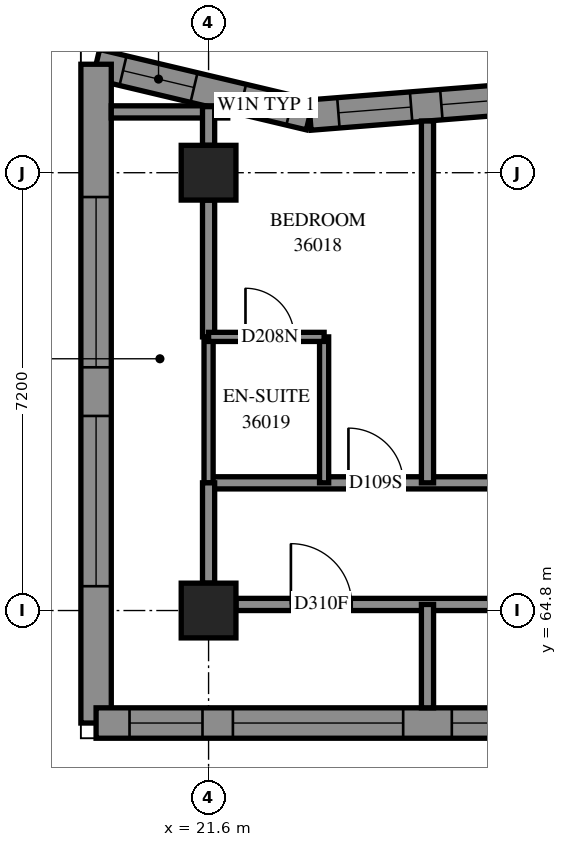
"""IFC4 building model, lengths in metres.
Left out: names, types, materials, properties, quantities, classifications, styles, units other than length and angle.
Written with IfcOpenShell. Run it as: python <this file> out.ifc"""

import sys

from ifc_helpers import new_model, si_unit, direction, frame, frame_2d, origin, origin_2d, place, context, subcontext, project, spatial, polyline, rectangle, outline, extrude, element, fill, save


model = new_model("IFC4")
c1 = context("Model", 3, precision=1e-05, world=origin(), true_north=direction((0.0, 1.0)))
c2 = subcontext(c1, "Body", "Model", "MODEL_VIEW")
j1 = project(units=[si_unit("LENGTHUNIT", "METRE"), si_unit("PLANEANGLEUNIT", "RADIAN")], contexts=[c1])
p1 = place(None, origin())
s1 = spatial("IfcSite", under=j1, at=p1, CompositionType="ELEMENT")
p2 = place(p1, origin())
s2 = spatial("IfcBuilding", under=s1, at=p2, CompositionType="ELEMENT")
p3 = place(p2, frame((0.0, 0.0, 135.4)))
s3 = spatial("IfcBuildingStorey", under=s2, at=p3, CompositionType="ELEMENT", Elevation=135.4)
for number, where, z_axis, x_axis in (
    (1, (21.6, 64.8, 0.0), (0.0, 0.0, 1.0), (1.0, 0.0, 0.0)),
    (2, (21.6, 72.0, 0.0), (0.0, 0.0, 1.0), (1.0, 0.0, 0.0)),
):
    element("IfcColumn", number, at=place(p3, frame(where, z_axis=z_axis, x_axis=x_axis)), inside=s3, PredefinedType="COLUMN", context=c2, shape_type="SweptSolid", body=[
        extrude(rectangle(XDim=0.9, YDim=0.9, at=origin_2d()), origin(), (0.0, 0.0, 1.0), 3.1),
    ])
p4 = place(p3, frame((27.071, 73.249, 0.0), z_axis=(0.0, 0.0, 1.0), x_axis=(-0.9968755515, -0.0789881945, 0.0)))
e3 = element("IfcWall", 3, at=p4, inside=s3, PredefinedType="SOLIDWALL", context=c2, shape_type="SweptSolid", body=[
    extrude(outline(polyline([(-0.02, -0.25), (3.778, -0.25), (3.856, 0.25), (0.02, 0.25), (-0.02, -0.25)])), origin(), (0.0, 0.0, 1.0), 3.1),
])
p5 = place(p4, frame((0.449, 0.0, 0.45)))
e4 = element("IfcOpeningElement", 4, at=p5, cuts=e3, PredefinedType="OPENING", context=c2, shape_type="SweptSolid", body=[
    extrude(rectangle(XDim=1.2, YDim=2.5, at=frame_2d((0.6, 1.25))), frame((0.0, 0.26, 0.0), z_axis=(0.0, -1.0, 0.0), x_axis=(1.0, 0.0, 0.0)), (0.0, 0.0, 1.0), 0.52),
])
p6 = place(p4, frame((2.147, 0.0, 0.45)))
e5 = element("IfcOpeningElement", 5, at=p6, cuts=e3, PredefinedType="OPENING", context=c2, shape_type="SweptSolid", body=[
    extrude(rectangle(XDim=1.2, YDim=2.5, at=frame_2d((0.6, 1.25))), frame((0.0, 0.26, 0.0), z_axis=(0.0, -1.0, 0.0), x_axis=(1.0, 0.0, 0.0)), (0.0, 0.0, 1.0), 0.52),
])
p7 = place(p3, frame((23.266, 72.948, 0.0), z_axis=(0.0, 0.0, 1.0), x_axis=(-0.9728851289, 0.2312888368, 0.0)))
e6 = element("IfcWall", 6, at=p7, inside=s3, PredefinedType="SOLIDWALL", context=c2, shape_type="SweptSolid", body=[
    extrude(outline(polyline([(0.039, -0.25), (3.93, -0.25), (3.298, 0.25), (-0.039, 0.25), (0.039, -0.25)])), origin(), (0.0, 0.0, 1.0), 3.1),
])
p8 = place(p7, frame((0.338, 0.0, 0.45)))
e7 = element("IfcOpeningElement", 7, at=p8, cuts=e6, PredefinedType="OPENING", context=c2, shape_type="SweptSolid", body=[
    extrude(rectangle(XDim=0.8, YDim=2.5, at=frame_2d((0.4, 1.25))), frame((0.0, 0.26, 0.0), z_axis=(0.0, -1.0, 0.0), x_axis=(1.0, 0.0, 0.0)), (0.0, 0.0, 1.0), 0.52),
])
p9 = place(p7, frame((1.959, 0.0, 0.5)))
e8 = element("IfcOpeningElement", 8, at=p9, cuts=e6, PredefinedType="OPENING", context=c2, shape_type="SweptSolid", body=[
    extrude(rectangle(XDim=1.2, YDim=2.45, at=frame_2d((0.6, 1.225))), frame((0.0, 0.26, 0.0), z_axis=(0.0, -1.0, 0.0), x_axis=(1.0, 0.0, 0.0)), (0.0, 0.0, 1.0), 0.52),
])
p10 = place(p3, frame((19.75, 73.784, 0.0), z_axis=(0.0, 0.0, 1.0), x_axis=(0.0, -1.0, 0.0)))
e9 = element("IfcWall", 9, at=p10, inside=s3, PredefinedType="SOLIDWALL", context=c2, shape_type="SweptSolid", body=[
    extrude(outline(polyline([(-0.316, -0.25), (11.084, -0.25), (10.584, 0.25), (0.316, 0.25), (-0.316, -0.25)])), origin(), (0.0, 0.0, 1.0), 3.1),
])
p11 = place(p10, frame((2.184, 0.0, 0.45)))
e10 = element("IfcOpeningElement", 10, at=p11, cuts=e9, PredefinedType="OPENING", context=c2, shape_type="SweptSolid", body=[
    extrude(rectangle(XDim=2.8, YDim=2.5, at=frame_2d((1.4, 1.25))), frame((0.0, 0.26, 0.0), z_axis=(0.0, -1.0, 0.0), x_axis=(1.0, 0.0, 0.0)), (0.0, 0.0, 1.0), 0.52),
])
p12 = place(p10, frame((5.784, 0.0, 0.45)))
e11 = element("IfcOpeningElement", 11, at=p12, cuts=e9, PredefinedType="OPENING", context=c2, shape_type="SweptSolid", body=[
    extrude(rectangle(XDim=2.8, YDim=2.5, at=frame_2d((1.4, 1.25))), frame((0.0, 0.26, 0.0), z_axis=(0.0, -1.0, 0.0), x_axis=(1.0, 0.0, 0.0)), (0.0, 0.0, 1.0), 0.52),
])
p13 = place(p3, frame((19.75, 62.95, 0.0), z_axis=(0.0, 0.0, 1.0), x_axis=(1.0, 0.0, 0.0)))
e12 = element("IfcWall", 12, at=p13, inside=s3, PredefinedType="SOLIDWALL", context=c2, shape_type="SweptSolid", body=[
    extrude(outline(polyline([(-0.25, -0.25), (15.05, -0.25), (15.55, 0.25), (0.25, 0.25), (-0.25, -0.25)])), origin(), (0.0, 0.0, 1.0), 3.1),
])
p14 = place(p13, frame((2.25, 0.0, 0.45)))
e13 = element("IfcOpeningElement", 13, at=p14, cuts=e12, PredefinedType="OPENING", context=c2, shape_type="SweptSolid", body=[
    extrude(rectangle(XDim=2.8, YDim=2.5, at=frame_2d((1.4, 1.25))), frame((0.0, 0.26, 0.0), z_axis=(0.0, -1.0, 0.0), x_axis=(1.0, 0.0, 0.0)), (0.0, 0.0, 1.0), 0.52),
])
p15 = place(p13, frame((5.85, 0.0, 0.45)))
e14 = element("IfcOpeningElement", 14, at=p15, cuts=e12, PredefinedType="OPENING", context=c2, shape_type="SweptSolid", body=[
    extrude(rectangle(XDim=2.8, YDim=2.5, at=frame_2d((1.4, 1.25))), frame((0.0, 0.26, 0.0), z_axis=(0.0, -1.0, 0.0), x_axis=(1.0, 0.0, 0.0)), (0.0, 0.0, 1.0), 0.52),
])
p16 = place(p13, frame((9.2, 0.0, 0.45)))
e15 = element("IfcOpeningElement", 15, at=p16, cuts=e12, PredefinedType="OPENING", context=c2, shape_type="SweptSolid", body=[
    extrude(rectangle(XDim=2.8, YDim=2.5, at=frame_2d((1.4, 1.25))), frame((0.0, 0.26, 0.0), z_axis=(0.0, -1.0, 0.0), x_axis=(1.0, 0.0, 0.0)), (0.0, 0.0, 1.0), 0.52),
])
p17 = place(p13, frame((0.55, 0.0, 0.45)))
e16 = element("IfcOpeningElement", 16, at=p17, cuts=e12, PredefinedType="OPENING", context=c2, shape_type="SweptSolid", body=[
    extrude(rectangle(XDim=1.2, YDim=2.5, at=frame_2d((0.6, 1.25))), frame((0.0, 0.26, 0.0), z_axis=(0.0, -1.0, 0.0), x_axis=(1.0, 0.0, 0.0)), (0.0, 0.0, 1.0), 0.52),
])
p18 = place(p13, frame((13.275, 0.0, 0.45)))
e17 = element("IfcOpeningElement", 17, at=p18, cuts=e12, PredefinedType="OPENING", context=c2, shape_type="SweptSolid", body=[
    extrude(rectangle(XDim=1.2, YDim=2.5, at=frame_2d((0.6, 1.25))), frame((0.0, 0.26, 0.0), z_axis=(0.0, -1.0, 0.0), x_axis=(1.0, 0.0, 0.0)), (0.0, 0.0, 1.0), 0.52),
])
p19 = place(p3, frame((21.6, 66.9, 0.0), z_axis=(0.0, 0.0, 1.0), x_axis=(1.0, 0.0, 0.0)))
e18 = element("IfcWall", 18, at=p19, inside=s3, PredefinedType="PARTITIONING", context=c2, shape_type="SweptSolid", body=[
    extrude(rectangle(XDim=19.0, YDim=0.2, at=frame_2d((9.5, 0.0))), origin(), (0.0, 0.0, 1.0), 3.1),
])
p20 = place(p19, frame((2.3, 0.0, 0.0)))
e19 = element("IfcOpeningElement", 19, at=p20, cuts=e18, PredefinedType="OPENING", context=c2, shape_type="SweptSolid", body=[
    extrude(rectangle(XDim=0.9, YDim=2.1, at=frame_2d((0.45, 1.05))), frame((0.0, 0.11, 0.0), z_axis=(0.0, -1.0, 0.0), x_axis=(1.0, 0.0, 0.0)), (0.0, 0.0, 1.0), 0.22),
])
p21 = place(p19, frame((5.957, 0.0, 0.0)))
e20 = element("IfcOpeningElement", 20, at=p21, cuts=e18, PredefinedType="OPENING", context=c2, shape_type="SweptSolid", body=[
    extrude(rectangle(XDim=0.9, YDim=2.1, at=frame_2d((0.45, 1.05))), frame((0.0, 0.11, 0.0), z_axis=(0.0, -1.0, 0.0), x_axis=(1.0, 0.0, 0.0)), (0.0, 0.0, 1.0), 0.22),
])
p22 = place(p19, frame((13.057, 0.0, 0.0)))
e21 = element("IfcOpeningElement", 21, at=p22, cuts=e18, PredefinedType="OPENING", context=c2, shape_type="SweptSolid", body=[
    extrude(rectangle(XDim=0.9, YDim=2.1, at=frame_2d((0.45, 1.05))), frame((0.0, 0.11, 0.0), z_axis=(0.0, -1.0, 0.0), x_axis=(1.0, 0.0, 0.0)), (0.0, 0.0, 1.0), 0.22),
])
p23 = place(p3, frame((22.05, 64.9, 0.0), z_axis=(0.0, 0.0, 1.0), x_axis=(1.0, 0.0, 0.0)))
e22 = element("IfcWall", 22, at=p23, inside=s3, PredefinedType="PARTITIONING", context=c2, shape_type="SweptSolid", body=[
    extrude(rectangle(XDim=6.3, YDim=0.2, at=frame_2d((3.15, 0.0))), origin(), (0.0, 0.0, 1.0), 2.6),
])
p24 = place(p23, frame((0.904, 0.0, 0.0)))
e23 = element("IfcOpeningElement", 23, at=p24, cuts=e22, PredefinedType="OPENING", context=c2, shape_type="SweptSolid", body=[
    extrude(rectangle(XDim=1.0, YDim=2.1, at=frame_2d((0.5, 1.05))), frame((0.0, 0.11, 0.0), z_axis=(0.0, -1.0, 0.0), x_axis=(1.0, 0.0, 0.0)), (0.0, 0.0, 1.0), 0.22),
])
p25 = place(p3, frame((25.2, 66.9, 0.0), z_axis=(0.0, 0.0, 1.0), x_axis=(0.0, 1.0, 0.0)))
e24 = element("IfcWall", 24, at=p25, inside=s3, PredefinedType="PARTITIONING", context=c2, shape_type="SweptSolid", body=[
    extrude(rectangle(XDim=5.95, YDim=0.2, at=frame_2d((2.975, 0.0))), origin(), (0.0, 0.0, 1.0), 3.1),
])
p26 = place(p3, frame((21.6, 66.9, 0.0), z_axis=(0.0, 0.0, 1.0), x_axis=(0.0, 1.0, 0.0)))
e25 = element("IfcWall", 25, at=p26, inside=s3, PredefinedType="PARTITIONING", context=c2, shape_type="SweptSolid", body=[
    extrude(rectangle(XDim=2.4, YDim=0.15, at=frame_2d((1.2, 0.0))), origin(), (0.0, 0.0, 1.0), 2.6),
])
p27 = place(p3, frame((23.5, 66.9, 0.0), z_axis=(0.0, 0.0, 1.0), x_axis=(0.0, 1.0, 0.0)))
e26 = element("IfcWall", 26, at=p27, inside=s3, PredefinedType="PARTITIONING", context=c2, shape_type="SweptSolid", body=[
    extrude(rectangle(XDim=2.4, YDim=0.15, at=frame_2d((1.2, 0.0))), origin(), (0.0, 0.0, 1.0), 3.1),
])
p28 = place(p3, frame((21.6, 69.3, 0.0), z_axis=(0.0, 0.0, 1.0), x_axis=(0.0, 1.0, 0.0)))
e27 = element("IfcWall", 27, at=p28, inside=s3, PredefinedType="PARTITIONING", context=c2, shape_type="SweptSolid", body=[
    extrude(rectangle(XDim=2.25, YDim=0.2, at=frame_2d((1.125, 0.0))), origin(), (0.0, 0.0, 1.0), 2.6),
])
p29 = place(p3, frame((21.6, 69.3, 0.0), z_axis=(0.0, 0.0, 1.0), x_axis=(1.0, 0.0, 0.0)))
e28 = element("IfcWall", 28, at=p29, inside=s3, PredefinedType="PARTITIONING", context=c2, shape_type="SweptSolid", body=[
    extrude(rectangle(XDim=1.9, YDim=0.15, at=frame_2d((0.95, 0.0))), origin(), (0.0, 0.0, 1.0), 3.1),
])
p30 = place(p29, frame((0.607, 0.0, 0.0)))
e29 = element("IfcOpeningElement", 29, at=p30, cuts=e28, PredefinedType="OPENING", context=c2, shape_type="SweptSolid", body=[
    extrude(rectangle(XDim=0.8, YDim=2.1, at=frame_2d((0.4, 1.05))), frame((0.0, 0.085, 0.0), z_axis=(0.0, -1.0, 0.0), x_axis=(1.0, 0.0, 0.0)), (0.0, 0.0, 1.0), 0.17),
])
p31 = place(p3, frame((20.0, 73.0, 0.0), z_axis=(0.0, 0.0, 1.0), x_axis=(1.0, 0.0, 0.0)))
e30 = element("IfcWall", 30, at=p31, inside=s3, PredefinedType="PARTITIONING", context=c2, shape_type="SweptSolid", body=[
    extrude(rectangle(XDim=1.915, YDim=0.2, at=frame_2d((0.958, 0.0))), origin(), (0.0, 0.0, 1.0), 3.1),
])
p32 = place(p3, frame((21.6, 65.25, 0.0), z_axis=(0.0, 0.0, 1.0), x_axis=(0.0, 1.0, 0.0)))
e31 = element("IfcWall", 31, at=p32, inside=s3, PredefinedType="PARTITIONING", context=c2, shape_type="SweptSolid", body=[
    extrude(rectangle(XDim=1.65, YDim=0.2, at=frame_2d((0.825, 0.0))), origin(), (0.0, 0.0, 1.0), 2.6),
])
p33 = place(p3, frame((25.2, 63.2, 0.0), z_axis=(0.0, 0.0, 1.0), x_axis=(0.0, 1.0, 0.0)))
e32 = element("IfcWall", 32, at=p33, inside=s3, PredefinedType="PARTITIONING", context=c2, shape_type="SweptSolid", body=[
    extrude(rectangle(XDim=1.7, YDim=0.2, at=frame_2d((0.85, 0.0))), origin(), (0.0, 0.0, 1.0), 3.1),
])
p34 = place(p3, frame((21.6, 72.45, 0.0), z_axis=(0.0, 0.0, 1.0), x_axis=(0.0, 1.0, 0.0)))
e33 = element("IfcWall", 33, at=p34, inside=s3, PredefinedType="PARTITIONING", context=c2, shape_type="SweptSolid", body=[
    extrude(rectangle(XDim=0.637, YDim=0.2, at=frame_2d((0.318, 0.0))), origin(), (0.0, 0.0, 1.0), 3.1),
])
p35 = place(p5, origin())
e34 = element("IfcWindow", 34, at=p35, inside=s3, PartitioningType="SINGLE_PANEL", PredefinedType="WINDOW", context=c2, shape_type="SweptSolid", body=[
    extrude(rectangle(XDim=1.2, YDim=2.5, at=frame_2d((0.6, 1.25))), frame((0.0, 0.18, 0.0), z_axis=(0.0, -1.0, 0.0), x_axis=(1.0, 0.0, 0.0)), (0.0, 0.0, 1.0), 0.06),
])
fill(e4, e34)
p36 = place(p6, origin())
e35 = element("IfcWindow", 35, at=p36, inside=s3, PartitioningType="SINGLE_PANEL", PredefinedType="WINDOW", context=c2, shape_type="SweptSolid", body=[
    extrude(rectangle(XDim=1.2, YDim=2.5, at=frame_2d((0.6, 1.25))), frame((0.0, 0.18, 0.0), z_axis=(0.0, -1.0, 0.0), x_axis=(1.0, 0.0, 0.0)), (0.0, 0.0, 1.0), 0.06),
])
fill(e5, e35)
p37 = place(p11, origin())
e36 = element("IfcWindow", 36, at=p37, inside=s3, PartitioningType="SINGLE_PANEL", PredefinedType="WINDOW", context=c2, shape_type="SweptSolid", body=[
    extrude(rectangle(XDim=2.8, YDim=2.5, at=frame_2d((1.4, 1.25))), frame((0.0, 0.18, 0.0), z_axis=(0.0, -1.0, 0.0), x_axis=(1.0, 0.0, 0.0)), (0.0, 0.0, 1.0), 0.06),
])
fill(e10, e36)
p38 = place(p12, origin())
e37 = element("IfcWindow", 37, at=p38, inside=s3, PartitioningType="SINGLE_PANEL", PredefinedType="WINDOW", context=c2, shape_type="SweptSolid", body=[
    extrude(rectangle(XDim=2.8, YDim=2.5, at=frame_2d((1.4, 1.25))), frame((0.0, 0.18, 0.0), z_axis=(0.0, -1.0, 0.0), x_axis=(1.0, 0.0, 0.0)), (0.0, 0.0, 1.0), 0.06),
])
fill(e11, e37)
p39 = place(p14, origin())
e38 = element("IfcWindow", 38, at=p39, inside=s3, PartitioningType="SINGLE_PANEL", PredefinedType="WINDOW", context=c2, shape_type="SweptSolid", body=[
    extrude(rectangle(XDim=2.8, YDim=2.5, at=frame_2d((1.4, 1.25))), frame((0.0, 0.18, 0.0), z_axis=(0.0, -1.0, 0.0), x_axis=(1.0, 0.0, 0.0)), (0.0, 0.0, 1.0), 0.06),
])
fill(e13, e38)
p40 = place(p15, origin())
e39 = element("IfcWindow", 39, at=p40, inside=s3, PartitioningType="SINGLE_PANEL", PredefinedType="WINDOW", context=c2, shape_type="SweptSolid", body=[
    extrude(rectangle(XDim=2.8, YDim=2.5, at=frame_2d((1.4, 1.25))), frame((0.0, 0.18, 0.0), z_axis=(0.0, -1.0, 0.0), x_axis=(1.0, 0.0, 0.0)), (0.0, 0.0, 1.0), 0.06),
])
fill(e14, e39)
p41 = place(p17, origin())
e40 = element("IfcWindow", 40, at=p41, inside=s3, PartitioningType="SINGLE_PANEL", PredefinedType="WINDOW", context=c2, shape_type="SweptSolid", body=[
    extrude(rectangle(XDim=1.2, YDim=2.5, at=frame_2d((0.6, 1.25))), frame((0.0, 0.18, 0.0), z_axis=(0.0, -1.0, 0.0), x_axis=(1.0, 0.0, 0.0)), (0.0, 0.0, 1.0), 0.06),
])
fill(e16, e40)
p42 = place(p24, origin())
e41 = element("IfcDoor", 41, at=p42, inside=s3, OperationType="SINGLE_SWING_RIGHT", PredefinedType="DOOR", context=c2, shape_type="SweptSolid", body=[
    extrude(rectangle(XDim=1.0, YDim=2.1, at=frame_2d((0.5, 1.05))), frame((0.0, 0.025, 0.0), z_axis=(0.0, -1.0, 0.0), x_axis=(1.0, 0.0, 0.0)), (0.0, 0.0, 1.0), 0.05),
])
fill(e23, e41)
p43 = place(p20, origin())
e42 = element("IfcDoor", 42, at=p43, inside=s3, OperationType="SINGLE_SWING_RIGHT", PredefinedType="DOOR", context=c2, shape_type="SweptSolid", body=[
    extrude(rectangle(XDim=0.9, YDim=2.1, at=frame_2d((0.45, 1.05))), frame((0.0, 0.025, 0.0), z_axis=(0.0, -1.0, 0.0), x_axis=(1.0, 0.0, 0.0)), (0.0, 0.0, 1.0), 0.05),
])
fill(e19, e42)
p44 = place(p30, origin())
e43 = element("IfcDoor", 43, at=p44, inside=s3, OperationType="SINGLE_SWING_RIGHT", PredefinedType="DOOR", context=c2, shape_type="SweptSolid", body=[
    extrude(rectangle(XDim=0.8, YDim=2.1, at=frame_2d((0.4, 1.05))), frame((0.0, 0.025, 0.0), z_axis=(0.0, -1.0, 0.0), x_axis=(1.0, 0.0, 0.0)), (0.0, 0.0, 1.0), 0.05),
])
fill(e29, e43)
p45 = place(p8, origin())
e44 = element("IfcWindow", 44, at=p45, inside=s3, PartitioningType="SINGLE_PANEL", PredefinedType="WINDOW", context=c2, shape_type="SweptSolid", body=[
    extrude(rectangle(XDim=0.8, YDim=2.5, at=frame_2d((0.4, 1.25))), frame((0.0, 0.18, 0.0), z_axis=(0.0, -1.0, 0.0), x_axis=(1.0, 0.0, 0.0)), (0.0, 0.0, 1.0), 0.06),
])
fill(e7, e44)
p46 = place(p9, origin())
e45 = element("IfcWindow", 45, at=p46, inside=s3, PartitioningType="SINGLE_PANEL", PredefinedType="WINDOW", context=c2, shape_type="SweptSolid", body=[
    extrude(rectangle(XDim=1.2, YDim=2.45, at=frame_2d((0.6, 1.225))), frame((0.0, 0.18, 0.0), z_axis=(0.0, -1.0, 0.0), x_axis=(1.0, 0.0, 0.0)), (0.0, 0.0, 1.0), 0.06),
])
fill(e8, e45)
save(model, sys.argv[1])
